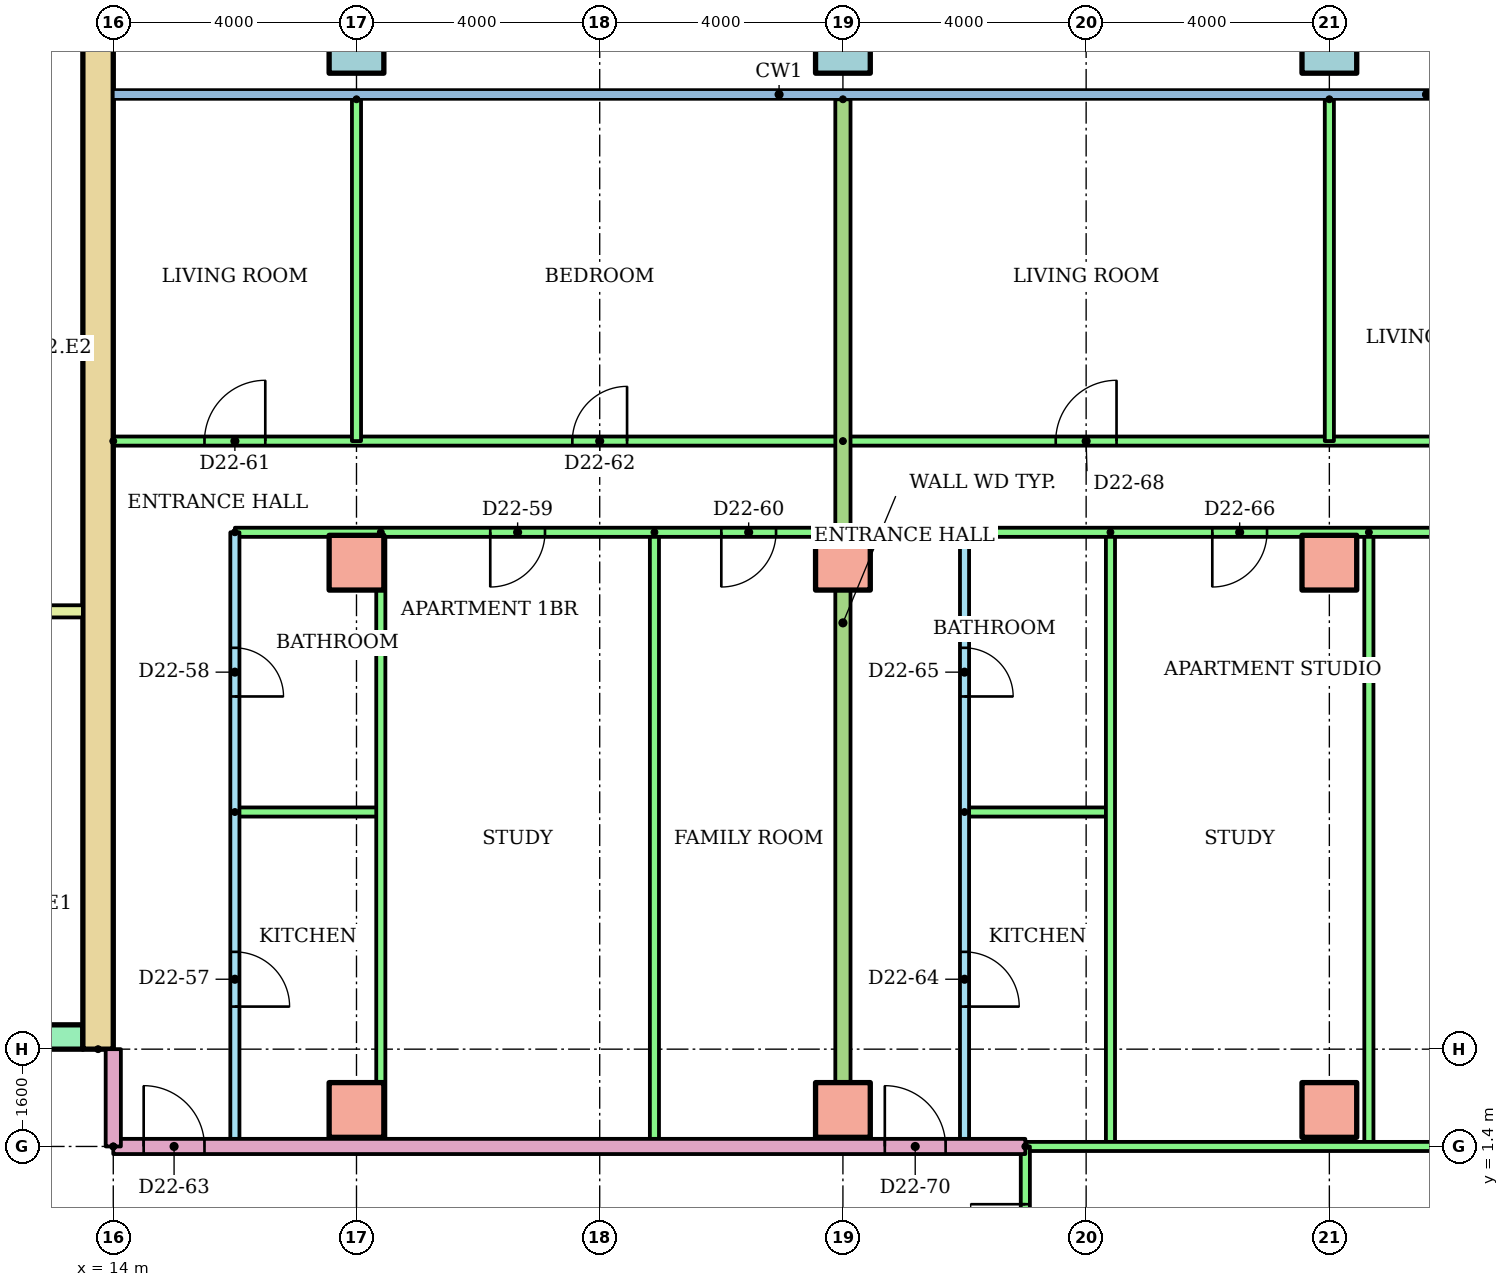
"""IFC4 building model, lengths in metres.
Left out: names, types, materials, properties, quantities, classifications, styles, units other than length and angle.
Written with IfcOpenShell. Run it as: python <this file> out.ifc"""

import sys

from ifc_helpers import new_model, si_unit, direction, frame, frame_2d, origin, origin_2d, place, context, subcontext, project, spatial, rectangle, hollow_rectangle, extrude, element, fill, save


model = new_model("IFC4")
c1 = context("Model", 3, precision=1e-05, world=origin(), true_north=direction((0.0, 1.0)))
c2 = subcontext(c1, "Body", "Model", "MODEL_VIEW")
j1 = project(units=[si_unit("LENGTHUNIT", "METRE"), si_unit("PLANEANGLEUNIT", "RADIAN")], contexts=[c1])
p1 = place(None, origin())
s1 = spatial("IfcSite", under=j1, at=p1, CompositionType="ELEMENT")
p2 = place(p1, origin())
s2 = spatial("IfcBuilding", under=s1, at=p2, CompositionType="ELEMENT")
p3 = place(p2, frame((0.0, 0.0, 87.1)))
s3 = spatial("IfcBuildingStorey", under=s2, at=p3, CompositionType="ELEMENT", Elevation=87.1)
for number, where in (
    (1, (18.0, 2.0, 0.0)),
    (2, (26.0, 2.0, 0.0)),
    (3, (34.0, 2.0, 0.0)),
    (4, (18.0, 11.0, 0.0)),
    (5, (26.0, 11.0, 0.0)),
    (6, (34.0, 11.0, 0.0)),
):
    element("IfcColumn", number, at=place(p3, frame(where)), inside=s3, PredefinedType="COLUMN", context=c2, shape_type="SweptSolid", body=[
        extrude(rectangle(XDim=0.9, YDim=0.9, at=origin_2d()), origin(), (0.0, 0.0, 1.0), 3.2),
    ])
for number, where in (
    (7, (18.0, 19.5, 0.0)),
    (8, (26.0, 19.5, 0.0)),
    (9, (34.0, 19.5, 0.0)),
):
    element("IfcColumn", number, at=place(p3, frame(where)), inside=s3, PredefinedType="COLUMN", context=c2, shape_type="SweptSolid", body=[
        extrude(hollow_rectangle(XDim=0.9, YDim=0.9, WallThickness=0.045, at=origin_2d()), origin(), (0.0, 0.0, 1.0), 3.2),
    ])
p4 = place(p3, frame((13.75, 3.0, 0.0), z_axis=(0.0, 0.0, 1.0), x_axis=(0.0, 1.0, 0.0)))
e10 = element("IfcWall", 10, at=p4, inside=s3, PredefinedType="SHEAR", context=c2, shape_type="SweptSolid", body=[
    extrude(rectangle(XDim=17.0, YDim=0.5, at=frame_2d((8.5, 0.0))), origin(), (0.0, 0.0, 1.0), 2.92),
])
p5 = place(p3, frame((-13.5, 3.2, 0.0)))
e11 = element("IfcWall", 11, at=p5, inside=s3, PredefinedType="SHEAR", context=c2, shape_type="SweptSolid", body=[
    extrude(rectangle(XDim=27.0, YDim=0.4, at=frame_2d((13.5, 0.0))), origin(), (0.0, 0.0, 1.0), 2.92),
])
p6 = place(p5, frame((6.861, 0.0, 0.0)))
e12 = element("IfcOpeningElement", 12, at=p6, cuts=e11, PredefinedType="OPENING", context=c2, shape_type="SweptSolid", body=[
    extrude(rectangle(XDim=1.1, YDim=2.1, at=frame_2d((0.55, 1.05))), frame((0.0, 0.21, 0.0), z_axis=(0.0, -1.0, 0.0), x_axis=(1.0, 0.0, 0.0)), (0.0, 0.0, 1.0), 0.42),
])
p7 = place(p5, frame((9.906, 0.0, 0.0)))
e13 = element("IfcOpeningElement", 13, at=p7, cuts=e11, PredefinedType="OPENING", context=c2, shape_type="SweptSolid", body=[
    extrude(rectangle(XDim=1.1, YDim=2.1, at=frame_2d((0.55, 1.05))), frame((0.0, 0.21, 0.0), z_axis=(0.0, -1.0, 0.0), x_axis=(1.0, 0.0, 0.0)), (0.0, 0.0, 1.0), 0.42),
])
p8 = place(p5, frame((15.994, 0.0, 0.0)))
e14 = element("IfcOpeningElement", 14, at=p8, cuts=e11, PredefinedType="OPENING", context=c2, shape_type="SweptSolid", body=[
    extrude(rectangle(XDim=1.1, YDim=2.1, at=frame_2d((0.55, 1.05))), frame((0.0, 0.21, 0.0), z_axis=(0.0, -1.0, 0.0), x_axis=(1.0, 0.0, 0.0)), (0.0, 0.0, 1.0), 0.42),
])
p9 = place(p5, frame((19.039, 0.0, 0.0)))
e15 = element("IfcOpeningElement", 15, at=p9, cuts=e11, PredefinedType="OPENING", context=c2, shape_type="SweptSolid", body=[
    extrude(rectangle(XDim=1.1, YDim=2.1, at=frame_2d((0.55, 1.05))), frame((0.0, 0.21, 0.0), z_axis=(0.0, -1.0, 0.0), x_axis=(1.0, 0.0, 0.0)), (0.0, 0.0, 1.0), 0.42),
])
p10 = place(p5, frame((12.6, 0.0, 0.0)))
e16 = element("IfcOpeningElement", 16, at=p10, cuts=e11, PredefinedType="OPENING", context=c2, shape_type="SweptSolid", body=[
    extrude(rectangle(XDim=1.8, YDim=2.1, at=frame_2d((0.9, 1.05))), frame((0.0, 0.21, 0.0), z_axis=(0.0, -1.0, 0.0), x_axis=(1.0, 0.0, 0.0)), (0.0, 0.0, 1.0), 0.42),
])
p11 = place(p3, frame((9.6, 10.2, 0.0)))
e17 = element("IfcWall", 17, at=p11, inside=s3, PredefinedType="PARTITIONING", context=c2, shape_type="SweptSolid", body=[
    extrude(rectangle(XDim=3.9, YDim=0.2, at=frame_2d((1.95, 0.0))), origin(), (0.0, 0.0, 1.0), 2.92),
])
p12 = place(p3, frame((16.0, 11.5, 0.0), z_axis=(0.0, 0.0, 1.0), x_axis=(0.0, -1.0, 0.0)))
e18 = element("IfcWall", 18, at=p12, inside=s3, PredefinedType="PARTITIONING", context=c2, shape_type="SweptSolid", body=[
    extrude(rectangle(XDim=10.1, YDim=0.15, at=frame_2d((5.05, 0.0))), origin(), (0.0, 0.0, 1.0), 2.4),
])
p13 = place(p12, frame((6.9, 0.0, 0.0)))
e19 = element("IfcOpeningElement", 19, at=p13, cuts=e18, PredefinedType="OPENING", context=c2, shape_type="SweptSolid", body=[
    extrude(rectangle(XDim=0.9, YDim=2.1, at=frame_2d((0.45, 1.05))), frame((0.0, 0.085, 0.0), z_axis=(0.0, -1.0, 0.0), x_axis=(1.0, 0.0, 0.0)), (0.0, 0.0, 1.0), 0.17),
])
p14 = place(p12, frame((1.9, 0.0, 0.0)))
e20 = element("IfcOpeningElement", 20, at=p14, cuts=e18, PredefinedType="OPENING", context=c2, shape_type="SweptSolid", body=[
    extrude(rectangle(XDim=0.8, YDim=2.1, at=frame_2d((0.4, 1.05))), frame((0.0, 0.085, 0.0), z_axis=(0.0, -1.0, 0.0), x_axis=(1.0, 0.0, 0.0)), (0.0, 0.0, 1.0), 0.17),
])
p15 = place(p3, frame((16.0, 6.9, 0.0)))
e21 = element("IfcWall", 21, at=p15, inside=s3, PredefinedType="PARTITIONING", context=c2, shape_type="SweptSolid", body=[
    extrude(rectangle(XDim=2.4, YDim=0.15, at=frame_2d((1.2, 0.0))), origin(), (0.0, 0.0, 1.0), 2.4),
])
for number, where, z_axis, x_axis in (
    (22, (18.4, 11.5, 0.0), (0.0, 0.0, 1.0), (0.0, -1.0, 0.0)),
    (23, (22.9, 11.5, 0.0), (0.0, 0.0, 1.0), (0.0, -1.0, 0.0)),
):
    element("IfcWall", number, at=place(p3, frame(where, z_axis=z_axis, x_axis=x_axis)), inside=s3, PredefinedType="PARTITIONING", context=c2, shape_type="SweptSolid", body=[
        extrude(rectangle(XDim=10.1, YDim=0.15, at=frame_2d((5.05, 0.0))), origin(), (0.0, 0.0, 1.0), 2.4),
    ])
p16 = place(p3, frame((26.0, 11.5, 0.0), z_axis=(0.0, 0.0, 1.0), x_axis=(-1.0, 0.0, 0.0)))
e24 = element("IfcWall", 24, at=p16, inside=s3, PredefinedType="PARTITIONING", context=c2, shape_type="SweptSolid", body=[
    extrude(rectangle(XDim=10.0, YDim=0.15, at=frame_2d((5.0, 0.0))), origin(), (0.0, 0.0, 1.0), 2.4),
])
p17 = place(p16, frame((4.9, 0.0, 0.0)))
e25 = element("IfcOpeningElement", 25, at=p17, cuts=e24, PredefinedType="OPENING", context=c2, shape_type="SweptSolid", body=[
    extrude(rectangle(XDim=0.9, YDim=2.1, at=frame_2d((0.45, 1.05))), frame((0.0, 0.085, 0.0), z_axis=(0.0, -1.0, 0.0), x_axis=(1.0, 0.0, 0.0)), (0.0, 0.0, 1.0), 0.17),
])
p18 = place(p16, frame((1.1, 0.0, 0.0)))
e26 = element("IfcOpeningElement", 26, at=p18, cuts=e24, PredefinedType="OPENING", context=c2, shape_type="SweptSolid", body=[
    extrude(rectangle(XDim=0.9, YDim=2.1, at=frame_2d((0.45, 1.05))), frame((0.0, 0.085, 0.0), z_axis=(0.0, -1.0, 0.0), x_axis=(1.0, 0.0, 0.0)), (0.0, 0.0, 1.0), 0.17),
])
p19 = place(p3, frame((14.0, 13.0, 0.0)))
e27 = element("IfcWall", 27, at=p19, inside=s3, PredefinedType="PARTITIONING", context=c2, shape_type="SweptSolid", body=[
    extrude(rectangle(XDim=12.0, YDim=0.15, at=frame_2d((6.0, 0.0))), origin(), (0.0, 0.0, 1.0), 2.4),
])
p20 = place(p19, frame((1.5, 0.0, 0.0)))
e28 = element("IfcOpeningElement", 28, at=p20, cuts=e27, PredefinedType="OPENING", context=c2, shape_type="SweptSolid", body=[
    extrude(rectangle(XDim=1.0, YDim=2.1, at=frame_2d((0.5, 1.05))), frame((0.0, 0.085, 0.0), z_axis=(0.0, -1.0, 0.0), x_axis=(1.0, 0.0, 0.0)), (0.0, 0.0, 1.0), 0.17),
])
p21 = place(p19, frame((7.55, 0.0, 0.0)))
e29 = element("IfcOpeningElement", 29, at=p21, cuts=e27, PredefinedType="OPENING", context=c2, shape_type="SweptSolid", body=[
    extrude(rectangle(XDim=0.9, YDim=2.1, at=frame_2d((0.45, 1.05))), frame((0.0, 0.085, 0.0), z_axis=(0.0, -1.0, 0.0), x_axis=(1.0, 0.0, 0.0)), (0.0, 0.0, 1.0), 0.17),
])
p22 = place(p3, frame((18.0, 18.621, 0.0), z_axis=(0.0, 0.0, 1.0), x_axis=(0.0, -1.0, 0.0)))
e30 = element("IfcWall", 30, at=p22, inside=s3, PredefinedType="PARTITIONING", context=c2, shape_type="SweptSolid", body=[
    extrude(rectangle(XDim=5.621, YDim=0.15, at=frame_2d((2.811, 0.0))), origin(), (0.0, 0.0, 1.0), 2.4),
])
p23 = place(p3, frame((28.0, 11.5, 0.0), z_axis=(0.0, 0.0, 1.0), x_axis=(0.0, -1.0, 0.0)))
e31 = element("IfcWall", 31, at=p23, inside=s3, PredefinedType="PARTITIONING", context=c2, shape_type="SweptSolid", body=[
    extrude(rectangle(XDim=10.1, YDim=0.15, at=frame_2d((5.05, 0.0))), origin(), (0.0, 0.0, 1.0), 2.4),
])
p24 = place(p23, frame((6.9, 0.0, 0.0)))
e32 = element("IfcOpeningElement", 32, at=p24, cuts=e31, PredefinedType="OPENING", context=c2, shape_type="SweptSolid", body=[
    extrude(rectangle(XDim=0.9, YDim=2.1, at=frame_2d((0.45, 1.05))), frame((0.0, 0.085, 0.0), z_axis=(0.0, -1.0, 0.0), x_axis=(1.0, 0.0, 0.0)), (0.0, 0.0, 1.0), 0.17),
])
p25 = place(p23, frame((1.9, 0.0, 0.0)))
e33 = element("IfcOpeningElement", 33, at=p25, cuts=e31, PredefinedType="OPENING", context=c2, shape_type="SweptSolid", body=[
    extrude(rectangle(XDim=0.8, YDim=2.1, at=frame_2d((0.4, 1.05))), frame((0.0, 0.085, 0.0), z_axis=(0.0, -1.0, 0.0), x_axis=(1.0, 0.0, 0.0)), (0.0, 0.0, 1.0), 0.17),
])
p26 = place(p3, frame((28.0, 6.9, 0.0)))
e34 = element("IfcWall", 34, at=p26, inside=s3, PredefinedType="PARTITIONING", context=c2, shape_type="SweptSolid", body=[
    extrude(rectangle(XDim=2.4, YDim=0.15, at=frame_2d((1.2, 0.0))), origin(), (0.0, 0.0, 1.0), 2.4),
])
for number, where, z_axis, x_axis in (
    (35, (30.4, 11.5, 0.0), (0.0, 0.0, 1.0), (0.0, -1.0, 0.0)),
    (36, (34.65, 11.5, 0.0), (0.0, 0.0, 1.0), (0.0, -1.0, 0.0)),
):
    element("IfcWall", number, at=place(p3, frame(where, z_axis=z_axis, x_axis=x_axis)), inside=s3, PredefinedType="PARTITIONING", context=c2, shape_type="SweptSolid", body=[
        extrude(rectangle(XDim=10.1, YDim=0.15, at=frame_2d((5.05, 0.0))), origin(), (0.0, 0.0, 1.0), 2.4),
    ])
p27 = place(p3, frame((40.62, 11.5, 0.0), z_axis=(0.0, 0.0, 1.0), x_axis=(-1.0, 0.0, 0.0)))
e37 = element("IfcWall", 37, at=p27, inside=s3, PredefinedType="PARTITIONING", context=c2, shape_type="SweptSolid", body=[
    extrude(rectangle(XDim=12.62, YDim=0.15, at=frame_2d((6.31, 0.0))), origin(), (0.0, 0.0, 1.0), 2.4),
])
p28 = place(p27, frame((7.645, 0.0, 0.0)))
e38 = element("IfcOpeningElement", 38, at=p28, cuts=e37, PredefinedType="OPENING", context=c2, shape_type="SweptSolid", body=[
    extrude(rectangle(XDim=0.9, YDim=2.1, at=frame_2d((0.45, 1.05))), frame((0.0, 0.085, 0.0), z_axis=(0.0, -1.0, 0.0), x_axis=(1.0, 0.0, 0.0)), (0.0, 0.0, 1.0), 0.17),
])
p29 = place(p27, frame((2.645, 0.0, 0.0)))
e39 = element("IfcOpeningElement", 39, at=p29, cuts=e37, PredefinedType="OPENING", context=c2, shape_type="SweptSolid", body=[
    extrude(rectangle(XDim=0.9, YDim=2.1, at=frame_2d((0.45, 1.05))), frame((0.0, 0.085, 0.0), z_axis=(0.0, -1.0, 0.0), x_axis=(1.0, 0.0, 0.0)), (0.0, 0.0, 1.0), 0.17),
])
p30 = place(p3, frame((26.0, 13.0, 0.0)))
e40 = element("IfcWall", 40, at=p30, inside=s3, PredefinedType="PARTITIONING", context=c2, shape_type="SweptSolid", body=[
    extrude(rectangle(XDim=14.62, YDim=0.15, at=frame_2d((7.31, 0.0))), origin(), (0.0, 0.0, 1.0), 2.4),
])
p31 = place(p30, frame((3.5, 0.0, 0.0)))
e41 = element("IfcOpeningElement", 41, at=p31, cuts=e40, PredefinedType="OPENING", context=c2, shape_type="SweptSolid", body=[
    extrude(rectangle(XDim=1.0, YDim=2.1, at=frame_2d((0.5, 1.05))), frame((0.0, 0.085, 0.0), z_axis=(0.0, -1.0, 0.0), x_axis=(1.0, 0.0, 0.0)), (0.0, 0.0, 1.0), 0.17),
])
p32 = place(p30, frame((10.7, 0.0, 0.0)))
e42 = element("IfcOpeningElement", 42, at=p32, cuts=e40, PredefinedType="OPENING", context=c2, shape_type="SweptSolid", body=[
    extrude(rectangle(XDim=1.0, YDim=2.1, at=frame_2d((0.5, 1.05))), frame((0.0, 0.085, 0.0), z_axis=(0.0, -1.0, 0.0), x_axis=(1.0, 0.0, 0.0)), (0.0, 0.0, 1.0), 0.17),
])
p33 = place(p3, frame((34.0, 18.621, 0.0), z_axis=(0.0, 0.0, 1.0), x_axis=(0.0, -1.0, 0.0)))
e43 = element("IfcWall", 43, at=p33, inside=s3, PredefinedType="PARTITIONING", context=c2, shape_type="SweptSolid", body=[
    extrude(rectangle(XDim=5.621, YDim=0.15, at=frame_2d((2.811, 0.0))), origin(), (0.0, 0.0, 1.0), 2.4),
])
p34 = place(p3, frame((26.0, 18.621, 0.0), z_axis=(0.0, 0.0, 1.0), x_axis=(0.0, -1.0, 0.0)))
e44 = element("IfcWall", 44, at=p34, inside=s3, PredefinedType="PARTITIONING", context=c2, shape_type="SweptSolid", body=[
    extrude(rectangle(XDim=17.221, YDim=0.25, at=frame_2d((8.611, 0.0))), origin(), (0.0, 0.0, 1.0), 2.4),
])
p35 = place(p3, frame((14.0, 1.4, 0.0)))
e45 = element("IfcWall", 45, at=p35, inside=s3, PredefinedType="PARTITIONING", context=c2, shape_type="SweptSolid", body=[
    extrude(rectangle(XDim=15.0, YDim=0.25, at=frame_2d((7.5, 0.0))), origin(), (0.0, 0.0, 1.0), 2.4),
])
p36 = place(p35, frame((0.5, 0.0, 0.0)))
e46 = element("IfcOpeningElement", 46, at=p36, cuts=e45, PredefinedType="OPENING", context=c2, shape_type="SweptSolid", body=[
    extrude(rectangle(XDim=1.0, YDim=2.1, at=frame_2d((0.5, 1.05))), frame((0.0, 0.135, 0.0), z_axis=(0.0, -1.0, 0.0), x_axis=(1.0, 0.0, 0.0)), (0.0, 0.0, 1.0), 0.27),
])
p37 = place(p35, frame((12.689, 0.0, 0.0)))
e47 = element("IfcOpeningElement", 47, at=p37, cuts=e45, PredefinedType="OPENING", context=c2, shape_type="SweptSolid", body=[
    extrude(rectangle(XDim=1.0, YDim=2.1, at=frame_2d((0.5, 1.05))), frame((0.0, 0.135, 0.0), z_axis=(0.0, -1.0, 0.0), x_axis=(1.0, 0.0, 0.0)), (0.0, 0.0, 1.0), 0.27),
])
p38 = place(p3, frame((29.0, 1.4, 0.0)))
e48 = element("IfcWall", 48, at=p38, inside=s3, PredefinedType="PARTITIONING", context=c2, shape_type="SweptSolid", body=[
    extrude(rectangle(XDim=11.62, YDim=0.15, at=frame_2d((5.81, 0.0))), origin(), (0.0, 0.0, 1.0), 2.4),
])
p39 = place(p3, frame((29.0, -1.4, 0.0), z_axis=(0.0, 0.0, 1.0), x_axis=(0.0, 1.0, 0.0)))
e49 = element("IfcWall", 49, at=p39, inside=s3, PredefinedType="PARTITIONING", context=c2, shape_type="SweptSolid", body=[
    extrude(rectangle(XDim=2.8, YDim=0.15, at=frame_2d((1.4, 0.0))), origin(), (0.0, 0.0, 1.0), 2.4),
])
p40 = place(p39, frame((0.95, 0.0, 0.0)))
e50 = element("IfcOpeningElement", 50, at=p40, cuts=e49, PredefinedType="OPENING", context=c2, shape_type="SweptSolid", body=[
    extrude(rectangle(XDim=0.9, YDim=2.1, at=frame_2d((0.45, 1.05))), frame((0.0, 0.085, 0.0), z_axis=(0.0, -1.0, 0.0), x_axis=(1.0, 0.0, 0.0)), (0.0, 0.0, 1.0), 0.17),
])
p41 = place(p3, frame((14.0, 1.4, 0.0), z_axis=(0.0, 0.0, 1.0), x_axis=(0.0, 1.0, 0.0)))
e51 = element("IfcWall", 51, at=p41, inside=s3, PredefinedType="PARTITIONING", context=c2, shape_type="SweptSolid", body=[
    extrude(rectangle(XDim=1.6, YDim=0.25, at=frame_2d((0.8, 0.0))), origin(), (0.0, 0.0, 1.0), 2.4),
])
p42 = place(p13, origin())
e52 = element("IfcDoor", 52, at=p42, inside=s3, OperationType="SINGLE_SWING_RIGHT", PredefinedType="DOOR", context=c2, shape_type="SweptSolid", body=[
    extrude(rectangle(XDim=0.9, YDim=2.1, at=frame_2d((0.45, 1.05))), frame((0.0, 0.025, 0.0), z_axis=(0.0, -1.0, 0.0), x_axis=(1.0, 0.0, 0.0)), (0.0, 0.0, 1.0), 0.05),
])
fill(e19, e52)
p43 = place(p14, origin())
e53 = element("IfcDoor", 53, at=p43, inside=s3, OperationType="SINGLE_SWING_RIGHT", PredefinedType="DOOR", context=c2, shape_type="SweptSolid", body=[
    extrude(rectangle(XDim=0.8, YDim=2.1, at=frame_2d((0.4, 1.05))), frame((0.0, 0.025, 0.0), z_axis=(0.0, -1.0, 0.0), x_axis=(1.0, 0.0, 0.0)), (0.0, 0.0, 1.0), 0.05),
])
fill(e20, e53)
p44 = place(p17, origin())
e54 = element("IfcDoor", 54, at=p44, inside=s3, OperationType="SINGLE_SWING_RIGHT", PredefinedType="DOOR", context=c2, shape_type="SweptSolid", body=[
    extrude(rectangle(XDim=0.9, YDim=2.1, at=frame_2d((0.45, 1.05))), frame((0.0, 0.025, 0.0), z_axis=(0.0, -1.0, 0.0), x_axis=(1.0, 0.0, 0.0)), (0.0, 0.0, 1.0), 0.05),
])
fill(e25, e54)
p45 = place(p18, origin())
e55 = element("IfcDoor", 55, at=p45, inside=s3, OperationType="SINGLE_SWING_RIGHT", PredefinedType="DOOR", context=c2, shape_type="SweptSolid", body=[
    extrude(rectangle(XDim=0.9, YDim=2.1, at=frame_2d((0.45, 1.05))), frame((0.0, 0.025, 0.0), z_axis=(0.0, -1.0, 0.0), x_axis=(1.0, 0.0, 0.0)), (0.0, 0.0, 1.0), 0.05),
])
fill(e26, e55)
p46 = place(p20, origin())
e56 = element("IfcDoor", 56, at=p46, inside=s3, OperationType="SINGLE_SWING_RIGHT", PredefinedType="DOOR", context=c2, shape_type="SweptSolid", body=[
    extrude(rectangle(XDim=1.0, YDim=2.1, at=frame_2d((0.5, 1.05))), frame((0.0, 0.025, 0.0), z_axis=(0.0, -1.0, 0.0), x_axis=(1.0, 0.0, 0.0)), (0.0, 0.0, 1.0), 0.05),
])
fill(e28, e56)
p47 = place(p21, origin())
e57 = element("IfcDoor", 57, at=p47, inside=s3, OperationType="SINGLE_SWING_RIGHT", PredefinedType="DOOR", context=c2, shape_type="SweptSolid", body=[
    extrude(rectangle(XDim=0.9, YDim=2.1, at=frame_2d((0.45, 1.05))), frame((0.0, 0.025, 0.0), z_axis=(0.0, -1.0, 0.0), x_axis=(1.0, 0.0, 0.0)), (0.0, 0.0, 1.0), 0.05),
])
fill(e29, e57)
p48 = place(p36, origin())
e58 = element("IfcDoor", 58, at=p48, inside=s3, OperationType="SINGLE_SWING_LEFT", PredefinedType="DOOR", context=c2, shape_type="SweptSolid", body=[
    extrude(rectangle(XDim=1.0, YDim=2.1, at=frame_2d((0.5, 1.05))), frame((0.0, 0.025, 0.0), z_axis=(0.0, -1.0, 0.0), x_axis=(1.0, 0.0, 0.0)), (0.0, 0.0, 1.0), 0.05),
])
fill(e46, e58)
p49 = place(p24, origin())
e59 = element("IfcDoor", 59, at=p49, inside=s3, OperationType="SINGLE_SWING_RIGHT", PredefinedType="DOOR", context=c2, shape_type="SweptSolid", body=[
    extrude(rectangle(XDim=0.9, YDim=2.1, at=frame_2d((0.45, 1.05))), frame((0.0, 0.025, 0.0), z_axis=(0.0, -1.0, 0.0), x_axis=(1.0, 0.0, 0.0)), (0.0, 0.0, 1.0), 0.05),
])
fill(e32, e59)
p50 = place(p25, origin())
e60 = element("IfcDoor", 60, at=p50, inside=s3, OperationType="SINGLE_SWING_RIGHT", PredefinedType="DOOR", context=c2, shape_type="SweptSolid", body=[
    extrude(rectangle(XDim=0.8, YDim=2.1, at=frame_2d((0.4, 1.05))), frame((0.0, 0.025, 0.0), z_axis=(0.0, -1.0, 0.0), x_axis=(1.0, 0.0, 0.0)), (0.0, 0.0, 1.0), 0.05),
])
fill(e33, e60)
p51 = place(p28, origin())
e61 = element("IfcDoor", 61, at=p51, inside=s3, OperationType="SINGLE_SWING_RIGHT", PredefinedType="DOOR", context=c2, shape_type="SweptSolid", body=[
    extrude(rectangle(XDim=0.9, YDim=2.1, at=frame_2d((0.45, 1.05))), frame((0.0, 0.025, 0.0), z_axis=(0.0, -1.0, 0.0), x_axis=(1.0, 0.0, 0.0)), (0.0, 0.0, 1.0), 0.05),
])
fill(e38, e61)
p52 = place(p31, origin())
e62 = element("IfcDoor", 62, at=p52, inside=s3, OperationType="SINGLE_SWING_RIGHT", PredefinedType="DOOR", context=c2, shape_type="SweptSolid", body=[
    extrude(rectangle(XDim=1.0, YDim=2.1, at=frame_2d((0.5, 1.05))), frame((0.0, 0.025, 0.0), z_axis=(0.0, -1.0, 0.0), x_axis=(1.0, 0.0, 0.0)), (0.0, 0.0, 1.0), 0.05),
])
fill(e41, e62)
p53 = place(p37, origin())
e63 = element("IfcDoor", 63, at=p53, inside=s3, OperationType="SINGLE_SWING_LEFT", PredefinedType="DOOR", context=c2, shape_type="SweptSolid", body=[
    extrude(rectangle(XDim=1.0, YDim=2.1, at=frame_2d((0.5, 1.05))), frame((0.0, 0.025, 0.0), z_axis=(0.0, -1.0, 0.0), x_axis=(1.0, 0.0, 0.0)), (0.0, 0.0, 1.0), 0.05),
])
fill(e47, e63)
p54 = place(p40, origin())
e64 = element("IfcDoor", 64, at=p54, inside=s3, OperationType="SINGLE_SWING_RIGHT", PredefinedType="DOOR", context=c2, shape_type="SweptSolid", body=[
    extrude(rectangle(XDim=0.9, YDim=2.1, at=frame_2d((0.45, 1.05))), frame((0.0, 0.025, 0.0), z_axis=(0.0, -1.0, 0.0), x_axis=(1.0, 0.0, 0.0)), (0.0, 0.0, 1.0), 0.05),
])
fill(e50, e64)
save(model, sys.argv[1])
